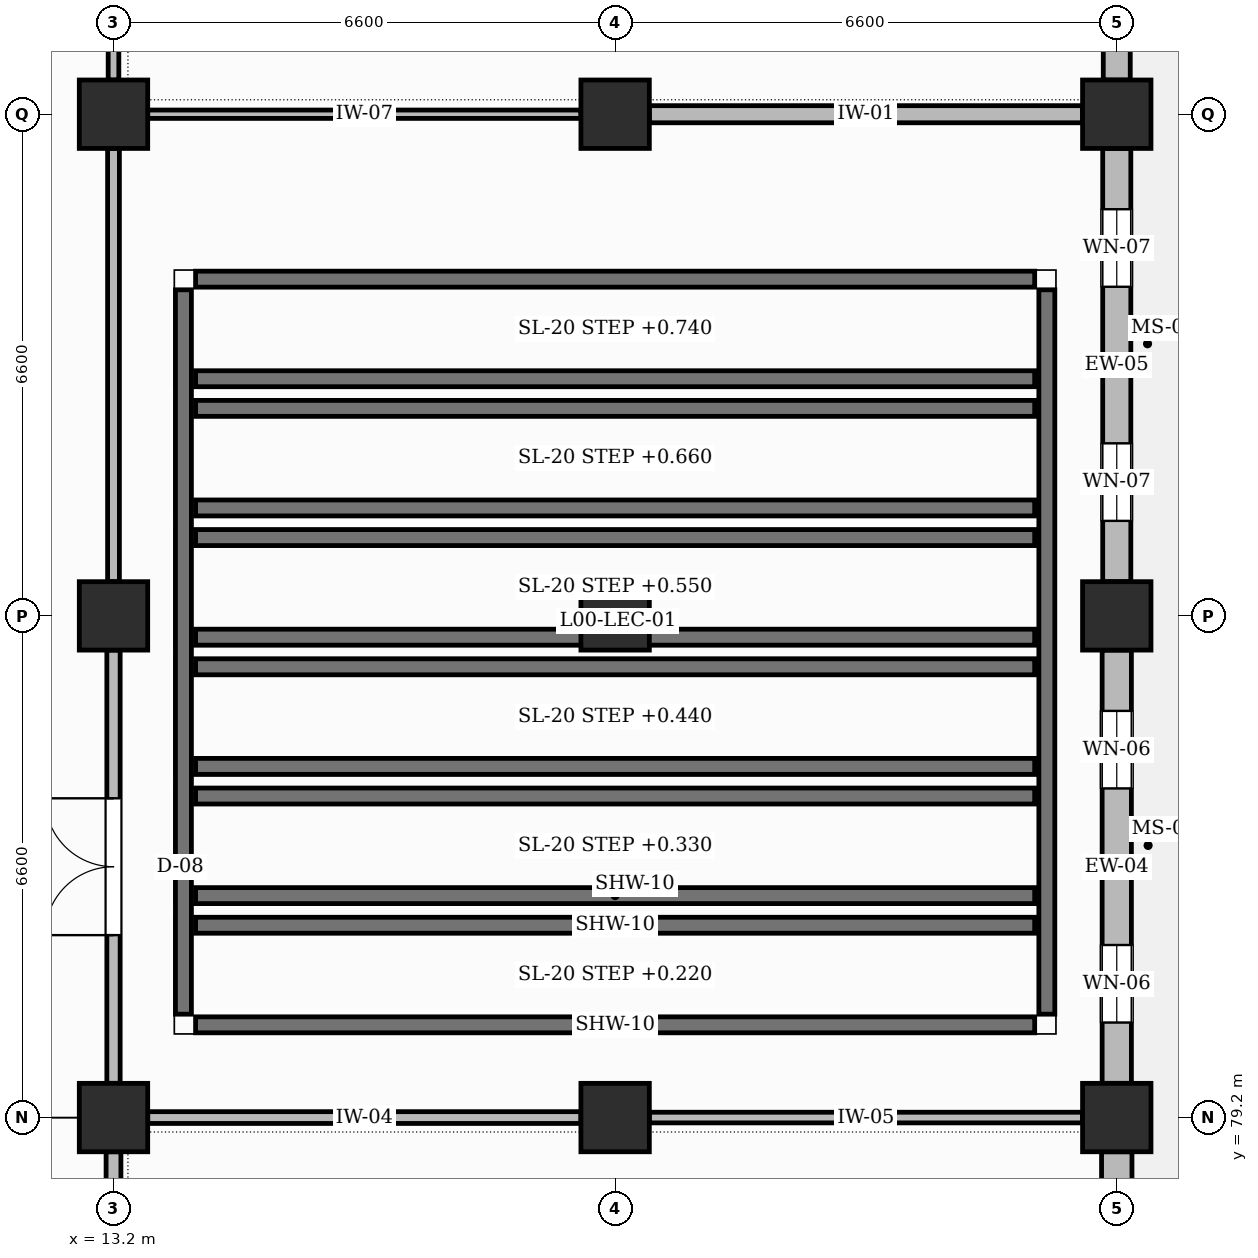
"""IFC4 building model, lengths in metres.
Left out: names, types, materials, properties, quantities, classifications, styles, units other than length and angle.
Written with IfcOpenShell. Run it as: python <this file> out.ifc"""

import sys

from ifc_helpers import new_model, si_unit, direction, frame, frame_2d, origin, origin_2d, place, context, subcontext, project, spatial, rectangle, extrude, element, fill, save


model = new_model("IFC4")
c1 = context("Model", 3, precision=1e-05, world=origin(), true_north=direction((0.0, 1.0)))
c2 = subcontext(c1, "Body", "Model", "MODEL_VIEW")
j1 = project(units=[si_unit("LENGTHUNIT", "METRE"), si_unit("PLANEANGLEUNIT", "RADIAN")], contexts=[c1])
p1 = place(None, origin())
s1 = spatial("IfcSite", under=j1, at=p1, CompositionType="ELEMENT")
p2 = place(p1, origin())
s2 = spatial("IfcBuilding", under=s1, at=p2, CompositionType="ELEMENT")
p3 = place(p2, origin())
s3 = spatial("IfcBuildingStorey", under=s2, at=p3, CompositionType="ELEMENT", Elevation=0.0)
for number, where, z_axis, x_axis in (
    (1, (13.2, 79.2, 0.0), (0.0, 0.0, 1.0), (1.0, 0.0, 0.0)),
    (2, (13.2, 85.8, 0.0), (0.0, 0.0, 1.0), (1.0, 0.0, 0.0)),
    (3, (13.2, 92.4, 0.0), (0.0, 0.0, 1.0), (1.0, 0.0, 0.0)),
    (4, (19.8, 79.2, 0.0), (0.0, 0.0, 1.0), (1.0, 0.0, 0.0)),
    (5, (19.8, 85.8, 0.0), (0.0, 0.0, 1.0), (1.0, 0.0, 0.0)),
    (6, (19.8, 92.4, 0.0), (0.0, 0.0, 1.0), (1.0, 0.0, 0.0)),
    (7, (26.4, 79.2, 0.0), (0.0, 0.0, 1.0), (1.0, 0.0, 0.0)),
    (8, (26.4, 85.8, 0.0), (0.0, 0.0, 1.0), (1.0, 0.0, 0.0)),
    (9, (26.4, 92.4, 0.0), (0.0, 0.0, 1.0), (1.0, 0.0, 0.0)),
):
    element("IfcColumn", number, at=place(p3, frame(where, z_axis=z_axis, x_axis=x_axis)), inside=s3, PredefinedType="COLUMN", context=c2, shape_type="SweptSolid", body=[
        extrude(rectangle(XDim=0.9, YDim=0.9, at=origin_2d()), origin(), (0.0, 0.0, 1.0), 5.4),
    ])
for number, where, z_axis, x_axis in (
    (10, (14.28, 80.42, 0.0), (0.0, 0.0, 1.0), (1.0, 0.0, 0.0)),
    (11, (14.28, 81.73, 0.0), (0.0, 0.0, 1.0), (1.0, 0.0, 0.0)),
):
    element("IfcWall", number, at=place(p3, frame(where, z_axis=z_axis, x_axis=x_axis)), inside=s3, PredefinedType="SOLIDWALL", context=c2, shape_type="SweptSolid", body=[
        extrude(rectangle(XDim=11.04, YDim=0.21, at=frame_2d((5.52, 0.0))), origin(), (0.0, 0.0, 1.0), 0.02),
    ])
for number, where, z_axis, x_axis in (
    (12, (14.12, 80.56, 0.0), (0.0, 0.0, 1.0), (0.0, 1.0, 0.0)),
    (13, (25.48, 80.56, 0.0), (0.0, 0.0, 1.0), (0.0, 1.0, 0.0)),
):
    element("IfcWall", number, at=place(p3, frame(where, z_axis=z_axis, x_axis=x_axis)), inside=s3, PredefinedType="SOLIDWALL", context=c2, shape_type="SweptSolid", body=[
        extrude(rectangle(XDim=1.03, YDim=0.21, at=frame_2d((0.515, 0.0))), origin(), (0.0, 0.0, 1.0), 0.02),
    ])
for number, where, z_axis, x_axis in (
    (14, (14.28, 82.12, 0.0), (0.0, 0.0, 1.0), (1.0, 0.0, 0.0)),
    (15, (14.28, 83.43, 0.0), (0.0, 0.0, 1.0), (1.0, 0.0, 0.0)),
):
    element("IfcWall", number, at=place(p3, frame(where, z_axis=z_axis, x_axis=x_axis)), inside=s3, PredefinedType="SOLIDWALL", context=c2, shape_type="SweptSolid", body=[
        extrude(rectangle(XDim=11.04, YDim=0.21, at=frame_2d((5.52, 0.0))), origin(), (0.0, 0.0, 1.0), 0.13),
    ])
for number, where, z_axis, x_axis in (
    (16, (14.12, 82.26, 0.0), (0.0, 0.0, 1.0), (0.0, 1.0, 0.0)),
    (17, (25.48, 82.26, 0.0), (0.0, 0.0, 1.0), (0.0, 1.0, 0.0)),
):
    element("IfcWall", number, at=place(p3, frame(where, z_axis=z_axis, x_axis=x_axis)), inside=s3, PredefinedType="SOLIDWALL", context=c2, shape_type="SweptSolid", body=[
        extrude(rectangle(XDim=1.03, YDim=0.21, at=frame_2d((0.515, 0.0))), origin(), (0.0, 0.0, 1.0), 0.13),
    ])
for number, where, z_axis, x_axis in (
    (18, (14.28, 83.82, 0.0), (0.0, 0.0, 1.0), (1.0, 0.0, 0.0)),
    (19, (14.28, 85.13, 0.0), (0.0, 0.0, 1.0), (1.0, 0.0, 0.0)),
):
    element("IfcWall", number, at=place(p3, frame(where, z_axis=z_axis, x_axis=x_axis)), inside=s3, PredefinedType="SOLIDWALL", context=c2, shape_type="SweptSolid", body=[
        extrude(rectangle(XDim=11.04, YDim=0.21, at=frame_2d((5.52, 0.0))), origin(), (0.0, 0.0, 1.0), 0.24),
    ])
for number, where, z_axis, x_axis in (
    (20, (14.12, 83.96, 0.0), (0.0, 0.0, 1.0), (0.0, 1.0, 0.0)),
    (21, (25.48, 83.96, 0.0), (0.0, 0.0, 1.0), (0.0, 1.0, 0.0)),
):
    element("IfcWall", number, at=place(p3, frame(where, z_axis=z_axis, x_axis=x_axis)), inside=s3, PredefinedType="SOLIDWALL", context=c2, shape_type="SweptSolid", body=[
        extrude(rectangle(XDim=1.03, YDim=0.21, at=frame_2d((0.515, 0.0))), origin(), (0.0, 0.0, 1.0), 0.24),
    ])
for number, where, z_axis, x_axis in (
    (22, (14.28, 85.52, 0.0), (0.0, 0.0, 1.0), (1.0, 0.0, 0.0)),
    (23, (14.28, 86.83, 0.0), (0.0, 0.0, 1.0), (1.0, 0.0, 0.0)),
):
    element("IfcWall", number, at=place(p3, frame(where, z_axis=z_axis, x_axis=x_axis)), inside=s3, PredefinedType="SOLIDWALL", context=c2, shape_type="SweptSolid", body=[
        extrude(rectangle(XDim=11.04, YDim=0.21, at=frame_2d((5.52, 0.0))), origin(), (0.0, 0.0, 1.0), 0.35),
    ])
for number, where, z_axis, x_axis in (
    (24, (14.12, 85.66, 0.0), (0.0, 0.0, 1.0), (0.0, 1.0, 0.0)),
    (25, (25.48, 85.66, 0.0), (0.0, 0.0, 1.0), (0.0, 1.0, 0.0)),
):
    element("IfcWall", number, at=place(p3, frame(where, z_axis=z_axis, x_axis=x_axis)), inside=s3, PredefinedType="SOLIDWALL", context=c2, shape_type="SweptSolid", body=[
        extrude(rectangle(XDim=1.03, YDim=0.21, at=frame_2d((0.515, 0.0))), origin(), (0.0, 0.0, 1.0), 0.35),
    ])
for number, where, z_axis, x_axis in (
    (26, (14.28, 87.22, 0.0), (0.0, 0.0, 1.0), (1.0, 0.0, 0.0)),
    (27, (14.28, 88.53, 0.0), (0.0, 0.0, 1.0), (1.0, 0.0, 0.0)),
):
    element("IfcWall", number, at=place(p3, frame(where, z_axis=z_axis, x_axis=x_axis)), inside=s3, PredefinedType="SOLIDWALL", context=c2, shape_type="SweptSolid", body=[
        extrude(rectangle(XDim=11.04, YDim=0.21, at=frame_2d((5.52, 0.0))), origin(), (0.0, 0.0, 1.0), 0.46),
    ])
for number, where, z_axis, x_axis in (
    (28, (14.12, 87.36, 0.0), (0.0, 0.0, 1.0), (0.0, 1.0, 0.0)),
    (29, (25.48, 87.36, 0.0), (0.0, 0.0, 1.0), (0.0, 1.0, 0.0)),
):
    element("IfcWall", number, at=place(p3, frame(where, z_axis=z_axis, x_axis=x_axis)), inside=s3, PredefinedType="SOLIDWALL", context=c2, shape_type="SweptSolid", body=[
        extrude(rectangle(XDim=1.03, YDim=0.21, at=frame_2d((0.515, 0.0))), origin(), (0.0, 0.0, 1.0), 0.46),
    ])
for number, where, z_axis, x_axis in (
    (30, (14.28, 88.92, 0.0), (0.0, 0.0, 1.0), (1.0, 0.0, 0.0)),
    (31, (14.28, 90.23, 0.0), (0.0, 0.0, 1.0), (1.0, 0.0, 0.0)),
):
    element("IfcWall", number, at=place(p3, frame(where, z_axis=z_axis, x_axis=x_axis)), inside=s3, PredefinedType="SOLIDWALL", context=c2, shape_type="SweptSolid", body=[
        extrude(rectangle(XDim=11.04, YDim=0.21, at=frame_2d((5.52, 0.0))), origin(), (0.0, 0.0, 1.0), 0.54),
    ])
for number, where, z_axis, x_axis in (
    (32, (14.12, 89.06, 0.0), (0.0, 0.0, 1.0), (0.0, 1.0, 0.0)),
    (33, (25.48, 89.06, 0.0), (0.0, 0.0, 1.0), (0.0, 1.0, 0.0)),
):
    element("IfcWall", number, at=place(p3, frame(where, z_axis=z_axis, x_axis=x_axis)), inside=s3, PredefinedType="SOLIDWALL", context=c2, shape_type="SweptSolid", body=[
        extrude(rectangle(XDim=1.03, YDim=0.21, at=frame_2d((0.515, 0.0))), origin(), (0.0, 0.0, 1.0), 0.54),
    ])
p4 = place(p3, frame((26.4, 73.05, 0.0), z_axis=(0.0, 0.0, 1.0), x_axis=(0.0, 1.0, 0.0)))
e34 = element("IfcWall", 34, at=p4, inside=s3, PredefinedType="SOLIDWALL", context=c2, shape_type="SweptSolid", body=[
    extrude(rectangle(XDim=5.7, YDim=0.4, at=frame_2d((2.85, 0.0))), origin(), (0.0, 0.0, 1.0), 4.45),
])
p5 = place(p4, frame((0.8, 0.0, 0.95)))
e35 = element("IfcOpeningElement", 35, at=p5, cuts=e34, PredefinedType="OPENING", context=c2, shape_type="SweptSolid", body=[
    extrude(rectangle(XDim=1.02, YDim=1.3, at=frame_2d((0.51, 0.65))), frame((0.0, 0.21, 0.0), z_axis=(0.0, -1.0, 0.0), x_axis=(1.0, 0.0, 0.0)), (0.0, 0.0, 1.0), 0.42),
])
p6 = place(p4, frame((3.88, 0.0, 0.95)))
e36 = element("IfcOpeningElement", 36, at=p6, cuts=e34, PredefinedType="OPENING", context=c2, shape_type="SweptSolid", body=[
    extrude(rectangle(XDim=1.02, YDim=1.3, at=frame_2d((0.51, 0.65))), frame((0.0, 0.21, 0.0), z_axis=(0.0, -1.0, 0.0), x_axis=(1.0, 0.0, 0.0)), (0.0, 0.0, 1.0), 0.42),
])
p7 = place(p3, frame((26.4, 79.65, 0.0), z_axis=(0.0, 0.0, 1.0), x_axis=(0.0, 1.0, 0.0)))
e37 = element("IfcWall", 37, at=p7, inside=s3, PredefinedType="SOLIDWALL", context=c2, shape_type="SweptSolid", body=[
    extrude(rectangle(XDim=5.7, YDim=0.385, at=frame_2d((2.85, 0.0))), origin(), (0.0, 0.0, 1.0), 4.8),
])
p8 = place(p7, frame((0.8, 0.0, 0.95)))
e38 = element("IfcOpeningElement", 38, at=p8, cuts=e37, PredefinedType="OPENING", context=c2, shape_type="SweptSolid", body=[
    extrude(rectangle(XDim=1.02, YDim=1.52, at=frame_2d((0.51, 0.76))), frame((0.0, 0.202, 0.0), z_axis=(0.0, -1.0, 0.0), x_axis=(1.0, 0.0, 0.0)), (0.0, 0.0, 1.0), 0.405),
])
p9 = place(p7, frame((3.88, 0.0, 0.95)))
e39 = element("IfcOpeningElement", 39, at=p9, cuts=e37, PredefinedType="OPENING", context=c2, shape_type="SweptSolid", body=[
    extrude(rectangle(XDim=1.02, YDim=1.52, at=frame_2d((0.51, 0.76))), frame((0.0, 0.202, 0.0), z_axis=(0.0, -1.0, 0.0), x_axis=(1.0, 0.0, 0.0)), (0.0, 0.0, 1.0), 0.405),
])
p10 = place(p3, frame((26.4, 86.25, 0.0), z_axis=(0.0, 0.0, 1.0), x_axis=(0.0, 1.0, 0.0)))
e40 = element("IfcWall", 40, at=p10, inside=s3, PredefinedType="SOLIDWALL", context=c2, shape_type="SweptSolid", body=[
    extrude(rectangle(XDim=5.7, YDim=0.37, at=frame_2d((2.85, 0.0))), origin(), (0.0, 0.0, 1.0), 4.8),
])
p11 = place(p10, frame((0.8, 0.0, 0.95)))
e41 = element("IfcOpeningElement", 41, at=p11, cuts=e40, PredefinedType="OPENING", context=c2, shape_type="SweptSolid", body=[
    extrude(rectangle(XDim=1.02, YDim=1.74, at=frame_2d((0.51, 0.87))), frame((0.0, 0.195, 0.0), z_axis=(0.0, -1.0, 0.0), x_axis=(1.0, 0.0, 0.0)), (0.0, 0.0, 1.0), 0.39),
])
p12 = place(p10, frame((3.88, 0.0, 0.95)))
e42 = element("IfcOpeningElement", 42, at=p12, cuts=e40, PredefinedType="OPENING", context=c2, shape_type="SweptSolid", body=[
    extrude(rectangle(XDim=1.02, YDim=1.74, at=frame_2d((0.51, 0.87))), frame((0.0, 0.195, 0.0), z_axis=(0.0, -1.0, 0.0), x_axis=(1.0, 0.0, 0.0)), (0.0, 0.0, 1.0), 0.39),
])
p13 = place(p3, frame((26.4, 92.85, 0.0), z_axis=(0.0, 0.0, 1.0), x_axis=(0.0, 1.0, 0.0)))
e43 = element("IfcWall", 43, at=p13, inside=s3, PredefinedType="SOLIDWALL", context=c2, shape_type="SweptSolid", body=[
    extrude(rectangle(XDim=5.7, YDim=0.355, at=frame_2d((2.85, 0.0))), origin(), (0.0, 0.0, 1.0), 4.45),
])
p14 = place(p13, frame((0.8, 0.0, 0.95)))
e44 = element("IfcOpeningElement", 44, at=p14, cuts=e43, PredefinedType="OPENING", context=c2, shape_type="SweptSolid", body=[
    extrude(rectangle(XDim=1.02, YDim=1.96, at=frame_2d((0.51, 0.98))), frame((0.0, 0.188, 0.0), z_axis=(0.0, -1.0, 0.0), x_axis=(1.0, 0.0, 0.0)), (0.0, 0.0, 1.0), 0.375),
])
p15 = place(p13, frame((3.88, 0.0, 0.95)))
e45 = element("IfcOpeningElement", 45, at=p15, cuts=e43, PredefinedType="OPENING", context=c2, shape_type="SweptSolid", body=[
    extrude(rectangle(XDim=1.02, YDim=1.96, at=frame_2d((0.51, 0.98))), frame((0.0, 0.188, 0.0), z_axis=(0.0, -1.0, 0.0), x_axis=(1.0, 0.0, 0.0)), (0.0, 0.0, 1.0), 0.375),
])
p16 = place(p3, frame((13.2, 73.05, 0.0), z_axis=(0.0, 0.0, 1.0), x_axis=(0.0, 1.0, 0.0)))
e46 = element("IfcWall", 46, at=p16, inside=s3, PredefinedType="PARTITIONING", context=c2, shape_type="SweptSolid", body=[
    extrude(rectangle(XDim=5.7, YDim=0.195, at=frame_2d((2.85, 0.0))), origin(), (0.0, 0.0, 1.0), 4.3),
])
p17 = place(p3, frame((13.2, 79.65, 0.0), z_axis=(0.0, 0.0, 1.0), x_axis=(0.0, 1.0, 0.0)))
e47 = element("IfcWall", 47, at=p17, inside=s3, PredefinedType="PARTITIONING", context=c2, shape_type="SweptSolid", body=[
    extrude(rectangle(XDim=5.7, YDim=0.175, at=frame_2d((2.85, 0.0))), origin(), (0.0, 0.0, 1.0), 4.3),
])
p18 = place(p17, frame((1.95, 0.0, 0.0)))
e48 = element("IfcOpeningElement", 48, at=p18, cuts=e47, PredefinedType="OPENING", context=c2, shape_type="SweptSolid", body=[
    extrude(rectangle(XDim=1.8, YDim=2.3, at=frame_2d((0.9, 1.15))), frame((0.0, 0.097, 0.0), z_axis=(0.0, -1.0, 0.0), x_axis=(1.0, 0.0, 0.0)), (0.0, 0.0, 1.0), 0.195),
])
p19 = place(p3, frame((13.2, 86.25, 0.0), z_axis=(0.0, 0.0, 1.0), x_axis=(0.0, 1.0, 0.0)))
e49 = element("IfcWall", 49, at=p19, inside=s3, PredefinedType="PARTITIONING", context=c2, shape_type="SweptSolid", body=[
    extrude(rectangle(XDim=5.7, YDim=0.155, at=frame_2d((2.85, 0.0))), origin(), (0.0, 0.0, 1.0), 4.3),
])
p20 = place(p3, frame((13.2, 92.85, 0.0), z_axis=(0.0, 0.0, 1.0), x_axis=(0.0, 1.0, 0.0)))
e50 = element("IfcWall", 50, at=p20, inside=s3, PredefinedType="PARTITIONING", context=c2, shape_type="SweptSolid", body=[
    extrude(rectangle(XDim=5.7, YDim=0.14, at=frame_2d((2.85, 0.0))), origin(), (0.0, 0.0, 1.0), 4.3),
])
p21 = place(p20, frame((2.225, 0.0, 0.0)))
e51 = element("IfcOpeningElement", 51, at=p21, cuts=e50, PredefinedType="OPENING", context=c2, shape_type="SweptSolid", body=[
    extrude(rectangle(XDim=1.25, YDim=2.25, at=frame_2d((0.625, 1.125))), frame((0.0, 0.08, 0.0), z_axis=(0.0, -1.0, 0.0), x_axis=(1.0, 0.0, 0.0)), (0.0, 0.0, 1.0), 0.16),
])
p22 = place(p3, frame((13.65, 79.2, 0.0), z_axis=(0.0, 0.0, 1.0), x_axis=(1.0, 0.0, 0.0)))
e52 = element("IfcWall", 52, at=p22, inside=s3, PredefinedType="PARTITIONING", context=c2, shape_type="SweptSolid", body=[
    extrude(rectangle(XDim=5.7, YDim=0.155, at=frame_2d((2.85, 0.0))), origin(), (0.0, 0.0, 1.0), 3.85),
])
p23 = place(p3, frame((13.65, 92.4, 0.0), z_axis=(0.0, 0.0, 1.0), x_axis=(1.0, 0.0, 0.0)))
e53 = element("IfcWall", 53, at=p23, inside=s3, PredefinedType="PARTITIONING", context=c2, shape_type="SweptSolid", body=[
    extrude(rectangle(XDim=5.7, YDim=0.11, at=frame_2d((2.85, 0.0))), origin(), (0.0, 0.0, 1.0), 3.85),
])
p24 = place(p3, frame((20.25, 79.2, 0.0), z_axis=(0.0, 0.0, 1.0), x_axis=(1.0, 0.0, 0.0)))
e54 = element("IfcWall", 54, at=p24, inside=s3, PredefinedType="PARTITIONING", context=c2, shape_type="SweptSolid", body=[
    extrude(rectangle(XDim=5.7, YDim=0.14, at=frame_2d((2.85, 0.0))), origin(), (0.0, 0.0, 1.0), 3.85),
])
p25 = place(p3, frame((20.25, 92.4, 0.0), z_axis=(0.0, 0.0, 1.0), x_axis=(1.0, 0.0, 0.0)))
e55 = element("IfcWall", 55, at=p25, inside=s3, PredefinedType="PARTITIONING", context=c2, shape_type="SweptSolid", body=[
    extrude(rectangle(XDim=5.7, YDim=0.225, at=frame_2d((2.85, 0.0))), origin(), (0.0, 0.0, 1.0), 3.85),
])
p26 = place(p8, origin())
e56 = element("IfcWindow", 56, at=p26, inside=s3, PartitioningType="SINGLE_PANEL", PredefinedType="WINDOW", context=c2, shape_type="SweptSolid", body=[
    extrude(rectangle(XDim=1.02, YDim=1.52, at=frame_2d((0.51, 0.76))), frame((0.0, 0.03, 0.0), z_axis=(0.0, -1.0, 0.0), x_axis=(1.0, 0.0, 0.0)), (0.0, 0.0, 1.0), 0.06),
])
fill(e38, e56)
p27 = place(p9, origin())
e57 = element("IfcWindow", 57, at=p27, inside=s3, PartitioningType="SINGLE_PANEL", PredefinedType="WINDOW", context=c2, shape_type="SweptSolid", body=[
    extrude(rectangle(XDim=1.02, YDim=1.52, at=frame_2d((0.51, 0.76))), frame((0.0, 0.03, 0.0), z_axis=(0.0, -1.0, 0.0), x_axis=(1.0, 0.0, 0.0)), (0.0, 0.0, 1.0), 0.06),
])
fill(e39, e57)
p28 = place(p11, origin())
e58 = element("IfcWindow", 58, at=p28, inside=s3, PartitioningType="SINGLE_PANEL", PredefinedType="WINDOW", context=c2, shape_type="SweptSolid", body=[
    extrude(rectangle(XDim=1.02, YDim=1.74, at=frame_2d((0.51, 0.87))), frame((0.0, 0.03, 0.0), z_axis=(0.0, -1.0, 0.0), x_axis=(1.0, 0.0, 0.0)), (0.0, 0.0, 1.0), 0.06),
])
fill(e41, e58)
p29 = place(p12, origin())
e59 = element("IfcWindow", 59, at=p29, inside=s3, PartitioningType="SINGLE_PANEL", PredefinedType="WINDOW", context=c2, shape_type="SweptSolid", body=[
    extrude(rectangle(XDim=1.02, YDim=1.74, at=frame_2d((0.51, 0.87))), frame((0.0, 0.03, 0.0), z_axis=(0.0, -1.0, 0.0), x_axis=(1.0, 0.0, 0.0)), (0.0, 0.0, 1.0), 0.06),
])
fill(e42, e59)
p30 = place(p18, origin())
e60 = element("IfcDoor", 60, at=p30, inside=s3, OperationType="DOUBLE_DOOR_SINGLE_SWING", PredefinedType="DOOR", context=c2, shape_type="SweptSolid", body=[
    extrude(rectangle(XDim=1.8, YDim=2.3, at=frame_2d((0.9, 1.15))), frame((0.0, 0.025, 0.0), z_axis=(0.0, -1.0, 0.0), x_axis=(1.0, 0.0, 0.0)), (0.0, 0.0, 1.0), 0.05),
])
fill(e48, e60)
save(model, sys.argv[1])
